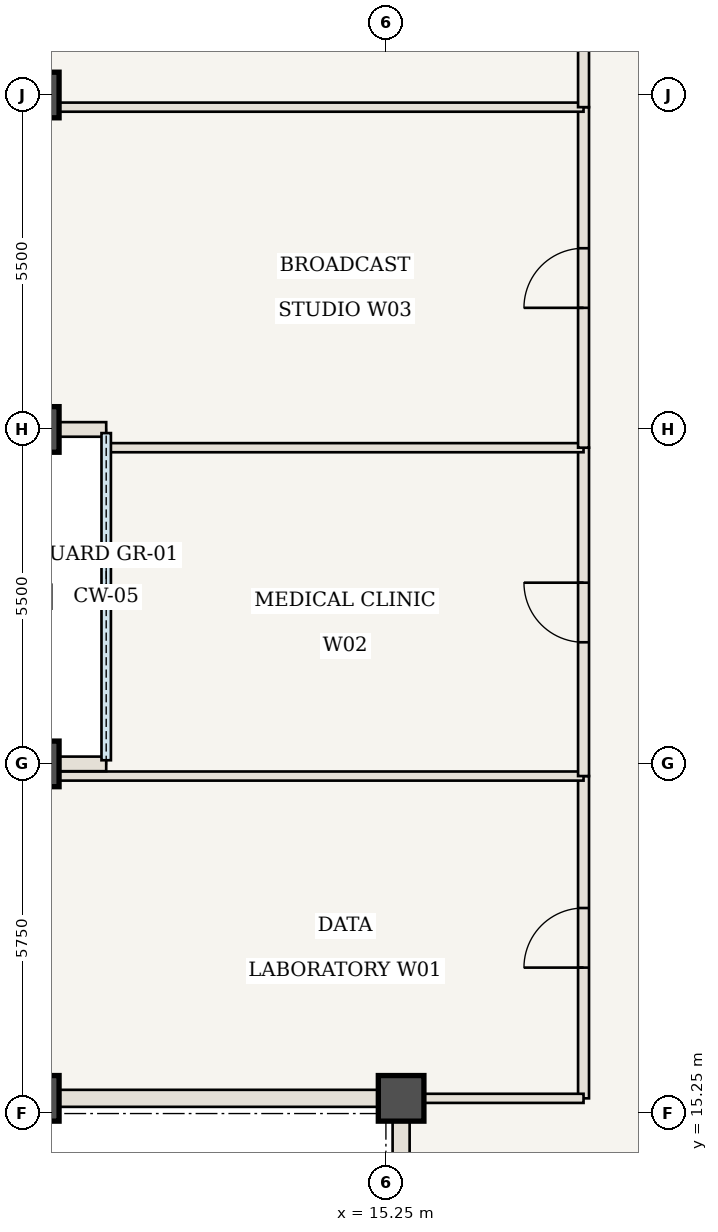
"""IFC4 building model, lengths in metres.
Left out: names, types, materials, properties, quantities, classifications, styles, units other than length and angle.
Written with IfcOpenShell. Run it as: python <this file> out.ifc"""

import sys

from ifc_helpers import new_model, si_unit, direction, frame, frame_2d, origin, origin_2d, place, context, subcontext, project, spatial, rectangle, extrude, element, fill, save


model = new_model("IFC4")
c1 = context("Model", 3, precision=1e-05, world=origin(), true_north=direction((0.0, 1.0)))
c2 = subcontext(c1, "Body", "Model", "MODEL_VIEW")
j1 = project(units=[si_unit("LENGTHUNIT", "METRE"), si_unit("PLANEANGLEUNIT", "RADIAN")], contexts=[c1])
p1 = place(None, origin())
s1 = spatial("IfcSite", under=j1, at=p1, CompositionType="ELEMENT")
p2 = place(p1, origin())
s2 = spatial("IfcBuilding", under=s1, at=p2, CompositionType="ELEMENT")
p3 = place(p2, frame((0.0, 0.0, 300.65)))
s3 = spatial("IfcBuildingStorey", under=s2, at=p3, CompositionType="ELEMENT", Elevation=300.65)
for number, where, z_axis, x_axis in (
    (1, (15.5, 15.5, 0.0), (0.0, 0.0, 1.0), (1.0, 0.0, 0.0)),
    (2, (9.5, 15.5, 0.0), (0.0, 0.0, 1.0), (1.0, 0.0, 0.0)),
    (3, (9.5, 21.0, 0.0), (0.0, 0.0, 1.0), (1.0, 0.0, 0.0)),
    (4, (9.5, 26.5, 0.0), (0.0, 0.0, 1.0), (1.0, 0.0, 0.0)),
    (5, (9.5, 32.0, 0.0), (0.0, 0.0, 1.0), (1.0, 0.0, 0.0)),
):
    element("IfcColumn", number, at=place(p3, frame(where, z_axis=z_axis, x_axis=x_axis)), inside=s3, PredefinedType="COLUMN", context=c2, shape_type="SweptSolid", body=[
        extrude(rectangle(XDim=0.75, YDim=0.75, at=origin_2d()), origin(), (0.0, 0.0, 1.0), 3.85),
    ])
p4 = place(p3, frame((18.5, 15.5, 0.0), z_axis=(0.0, 0.0, 1.0), x_axis=(0.0, 1.0, 0.0)))
e6 = element("IfcWall", 6, at=p4, inside=s3, PredefinedType="STANDARD", context=c2, shape_type="SweptSolid", body=[
    extrude(rectangle(XDim=5.3, YDim=0.18, at=frame_2d((2.65, 0.0))), origin(), (0.0, 0.0, 1.0), 3.685),
])
p5 = place(p4, frame((2.15, 0.0, 0.0)))
e7 = element("IfcOpeningElement", 7, at=p5, cuts=e6, PredefinedType="OPENING", context=c2, shape_type="SweptSolid", body=[
    extrude(rectangle(XDim=0.98, YDim=2.2, at=frame_2d((0.49, 1.1))), frame((0.0, 0.1, 0.0), z_axis=(0.0, -1.0, 0.0), x_axis=(1.0, 0.0, 0.0)), (0.0, 0.0, 1.0), 0.2),
])
p6 = place(p3, frame((9.56, 20.8, 0.0), z_axis=(0.0, 0.0, 1.0), x_axis=(1.0, 0.0, 0.0)))
e8 = element("IfcWall", 8, at=p6, inside=s3, PredefinedType="STANDARD", context=c2, shape_type="SweptSolid", body=[
    extrude(rectangle(XDim=8.94, YDim=0.15, at=frame_2d((4.47, 0.0))), origin(), (0.0, 0.0, 1.0), 3.14),
])
p7 = place(p3, frame((18.5, 20.8, 0.0), z_axis=(0.0, 0.0, 1.0), x_axis=(0.0, 1.0, 0.0)))
e9 = element("IfcWall", 9, at=p7, inside=s3, PredefinedType="STANDARD", context=c2, shape_type="SweptSolid", body=[
    extrude(rectangle(XDim=5.4, YDim=0.18, at=frame_2d((2.7, 0.0))), origin(), (0.0, 0.0, 1.0), 3.685),
])
p8 = place(p7, frame((2.2, 0.0, 0.0)))
e10 = element("IfcOpeningElement", 10, at=p8, cuts=e9, PredefinedType="OPENING", context=c2, shape_type="SweptSolid", body=[
    extrude(rectangle(XDim=0.98, YDim=2.2, at=frame_2d((0.49, 1.1))), frame((0.0, 0.1, 0.0), z_axis=(0.0, -1.0, 0.0), x_axis=(1.0, 0.0, 0.0)), (0.0, 0.0, 1.0), 0.2),
])
p9 = place(p3, frame((10.66, 26.2, 0.0), z_axis=(0.0, 0.0, 1.0), x_axis=(1.0, 0.0, 0.0)))
e11 = element("IfcWall", 11, at=p9, inside=s3, PredefinedType="STANDARD", context=c2, shape_type="SweptSolid", body=[
    extrude(rectangle(XDim=7.84, YDim=0.15, at=frame_2d((3.92, 0.0))), origin(), (0.0, 0.0, 1.0), 3.685),
])
p10 = place(p3, frame((18.5, 26.2, 0.0), z_axis=(0.0, 0.0, 1.0), x_axis=(0.0, 1.0, 0.0)))
e12 = element("IfcWall", 12, at=p10, inside=s3, PredefinedType="STANDARD", context=c2, shape_type="SweptSolid", body=[
    extrude(rectangle(XDim=5.6, YDim=0.18, at=frame_2d((2.8, 0.0))), origin(), (0.0, 0.0, 1.0), 3.685),
])
p11 = place(p10, frame((2.3, 0.0, 0.0)))
e13 = element("IfcOpeningElement", 13, at=p11, cuts=e12, PredefinedType="OPENING", context=c2, shape_type="SweptSolid", body=[
    extrude(rectangle(XDim=0.98, YDim=2.2, at=frame_2d((0.49, 1.1))), frame((0.0, 0.1, 0.0), z_axis=(0.0, -1.0, 0.0), x_axis=(1.0, 0.0, 0.0)), (0.0, 0.0, 1.0), 0.2),
])
p12 = place(p3, frame((9.56, 31.8, 0.0), z_axis=(0.0, 0.0, 1.0), x_axis=(1.0, 0.0, 0.0)))
e14 = element("IfcWall", 14, at=p12, inside=s3, PredefinedType="STANDARD", context=c2, shape_type="SweptSolid", body=[
    extrude(rectangle(XDim=8.94, YDim=0.15, at=frame_2d((4.47, 0.0))), origin(), (0.0, 0.0, 1.0), 3.14),
])
p13 = place(p3, frame((18.5, 31.8, 0.0), z_axis=(0.0, 0.0, 1.0), x_axis=(0.0, 1.0, 0.0)))
e15 = element("IfcWall", 15, at=p13, inside=s3, PredefinedType="STANDARD", context=c2, shape_type="SweptSolid", body=[
    extrude(rectangle(XDim=5.6, YDim=0.18, at=frame_2d((2.8, 0.0))), origin(), (0.0, 0.0, 1.0), 3.685),
])
p14 = place(p13, frame((2.3, 0.0, 0.0)))
e16 = element("IfcOpeningElement", 16, at=p14, cuts=e15, PredefinedType="OPENING", context=c2, shape_type="SweptSolid", body=[
    extrude(rectangle(XDim=0.98, YDim=2.2, at=frame_2d((0.49, 1.1))), frame((0.0, 0.1, 0.0), z_axis=(0.0, -1.0, 0.0), x_axis=(1.0, 0.0, 0.0)), (0.0, 0.0, 1.0), 0.2),
])
p15 = place(p3, frame((15.5, 15.5, 0.0), z_axis=(0.0, 0.0, 1.0), x_axis=(1.0, 0.0, 0.0)))
e17 = element("IfcWall", 17, at=p15, inside=s3, PredefinedType="STANDARD", context=c2, shape_type="SweptSolid", body=[
    extrude(rectangle(XDim=3.0, YDim=0.15, at=frame_2d((1.5, 0.0))), origin(), (0.0, 0.0, 1.0), 3.685),
])
for number, where, z_axis, x_axis in (
    (18, (9.5, 21.0, 0.0), (0.0, 0.0, 1.0), (1.0, 0.0, 0.0)),
    (19, (9.5, 26.5, 0.0), (0.0, 0.0, 1.0), (1.0, 0.0, 0.0)),
):
    element("IfcWall", number, at=place(p3, frame(where, z_axis=z_axis, x_axis=x_axis)), inside=s3, PredefinedType="USERDEFINED", context=c2, shape_type="SweptSolid", body=[
        extrude(rectangle(XDim=1.15, YDim=0.24, at=frame_2d((0.575, 0.0))), origin(), (0.0, 0.0, 1.0), 2.985),
    ])
for number, where, z_axis, x_axis in (
    (20, (15.5, 9.5, 0.0), (0.0, 0.0, 1.0), (0.0, 1.0, 0.0)),
    (21, (15.5, 15.5, 0.0), (0.0, 0.0, 1.0), (-1.0, 0.0, 0.0)),
):
    element("IfcWall", number, at=place(p3, frame(where, z_axis=z_axis, x_axis=x_axis)), inside=s3, PredefinedType="USERDEFINED", context=c2, shape_type="SweptSolid", body=[
        extrude(rectangle(XDim=6.0, YDim=0.28, at=frame_2d((3.0, 0.0))), origin(), (0.0, 0.0, 1.0), 2.985),
    ])
p16 = place(p5, origin())
e22 = element("IfcDoor", 22, at=p16, inside=s3, OperationType="SINGLE_SWING_LEFT", PredefinedType="DOOR", context=c2, shape_type="SweptSolid", body=[
    extrude(rectangle(XDim=0.98, YDim=2.2, at=frame_2d((0.49, 1.1))), frame((0.0, 0.025, 0.0), z_axis=(0.0, -1.0, 0.0), x_axis=(1.0, 0.0, 0.0)), (0.0, 0.0, 1.0), 0.05),
])
fill(e7, e22)
p17 = place(p8, origin())
e23 = element("IfcDoor", 23, at=p17, inside=s3, OperationType="SINGLE_SWING_RIGHT", PredefinedType="DOOR", context=c2, shape_type="SweptSolid", body=[
    extrude(rectangle(XDim=0.98, YDim=2.2, at=frame_2d((0.49, 1.1))), frame((0.0, 0.025, 0.0), z_axis=(0.0, -1.0, 0.0), x_axis=(1.0, 0.0, 0.0)), (0.0, 0.0, 1.0), 0.05),
])
fill(e10, e23)
p18 = place(p11, origin())
e24 = element("IfcDoor", 24, at=p18, inside=s3, OperationType="SINGLE_SWING_LEFT", PredefinedType="DOOR", context=c2, shape_type="SweptSolid", body=[
    extrude(rectangle(XDim=0.98, YDim=2.2, at=frame_2d((0.49, 1.1))), frame((0.0, 0.025, 0.0), z_axis=(0.0, -1.0, 0.0), x_axis=(1.0, 0.0, 0.0)), (0.0, 0.0, 1.0), 0.05),
])
fill(e13, e24)
save(model, sys.argv[1])
